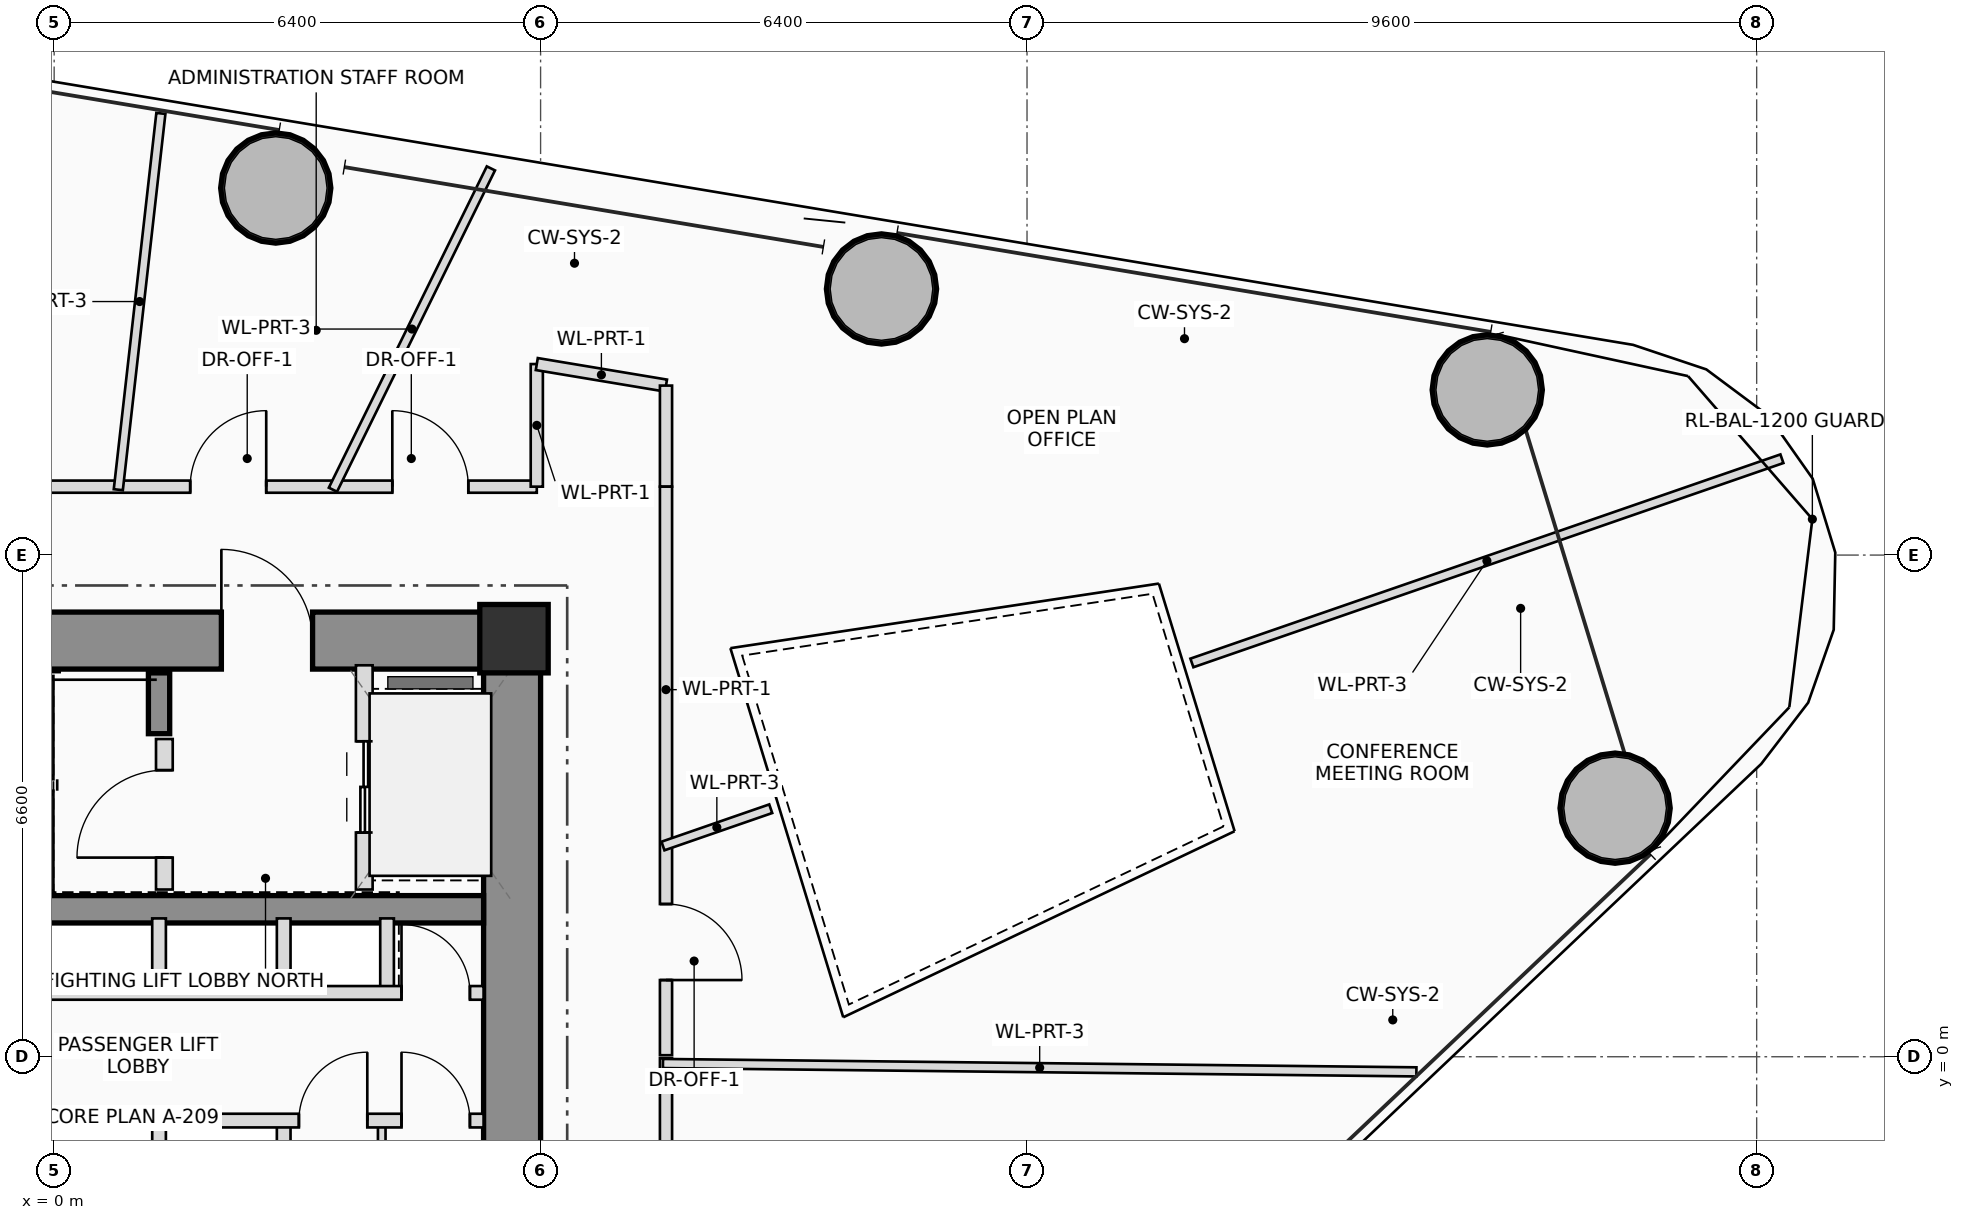
"""IFC4 building model, lengths in metres.
Left out: names, types, materials, properties, quantities, classifications, styles, units other than length and angle.
Written with IfcOpenShell. Run it as: python <this file> out.ifc"""

import sys

from ifc_helpers import new_model, si_unit, direction, frame, frame_2d, origin, origin_2d, place, context, subcontext, project, spatial, rectangle, hollow_circle, extrude, source, transform, mapped, element, fill, save


model = new_model("IFC4")
c1 = context("Model", 3, precision=1e-05, world=origin(), true_north=direction((0.0, 1.0)))
c2 = subcontext(c1, "Body", "Model", "MODEL_VIEW")
j1 = project(units=[si_unit("LENGTHUNIT", "METRE"), si_unit("PLANEANGLEUNIT", "RADIAN")], contexts=[c1])
p1 = place(None, origin())
s1 = spatial("IfcSite", under=j1, at=p1, CompositionType="ELEMENT")
p2 = place(p1, origin())
s2 = spatial("IfcBuilding", under=s1, at=p2, CompositionType="ELEMENT")
p3 = place(p2, frame((0.0, 0.0, 93.65)))
s3 = spatial("IfcBuildingStorey", under=s2, at=p3, CompositionType="ELEMENT", Elevation=93.65)
m1 = source(origin(), c2, "Body", "SweptSolid", [
    extrude(rectangle(XDim=0.9, YDim=0.9, at=origin_2d()), origin(), (0.0, 0.0, 1.0), 3.75),
])
p4 = place(p3, frame((6.05, 5.5, 0.0), z_axis=(0.0, 0.0, 1.0), x_axis=(1.0, 0.0, 0.0)))
e1 = element("IfcColumn", 1, at=p4, inside=s3, PredefinedType="COLUMN", context=c2, shape_type="MappedRepresentation", body=[
    mapped(m1, transform((0.0, 0.0, 0.0), scale=1.0)),
])
p5 = place(p3, frame((-6.4, 5.475, 0.0), z_axis=(0.0, 0.0, 1.0), x_axis=(1.0, 0.0, 0.0)))
e2 = element("IfcWall", 2, at=p5, inside=s3, PredefinedType="SHEAR", context=c2, shape_type="SweptSolid", body=[
    extrude(rectangle(XDim=12.8, YDim=0.75, at=frame_2d((6.4, 0.0))), origin(), (0.0, 0.0, 1.0), 3.75),
])
p6 = place(p5, frame((8.6, 0.0, 0.0)))
e3 = element("IfcOpeningElement", 3, at=p6, cuts=e2, PredefinedType="OPENING", context=c2, shape_type="SweptSolid", body=[
    extrude(rectangle(XDim=1.2, YDim=2.2, at=frame_2d((0.6, 1.1))), frame((0.0, 0.385, 0.0), z_axis=(0.0, -1.0, 0.0), x_axis=(1.0, 0.0, 0.0)), (0.0, 0.0, 1.0), 0.77),
])
p7 = place(p3, frame((6.025, -5.1, 0.0), z_axis=(0.0, 0.0, 1.0), x_axis=(0.0, 1.0, 0.0)))
e4 = element("IfcWall", 4, at=p7, inside=s3, PredefinedType="SHEAR", context=c2, shape_type="SweptSolid", body=[
    extrude(rectangle(XDim=10.2, YDim=0.75, at=frame_2d((5.1, 0.0))), origin(), (0.0, 0.0, 1.0), 3.75),
])
p8 = place(p3, frame((-5.65, 1.94, 0.0), z_axis=(0.0, 0.0, 1.0), x_axis=(1.0, 0.0, 0.0)))
e5 = element("IfcWall", 5, at=p8, inside=s3, PredefinedType="SHEAR", context=c2, shape_type="SweptSolid", body=[
    extrude(rectangle(XDim=11.3, YDim=0.36, at=frame_2d((5.65, 0.0))), origin(), (0.0, 0.0, 1.0), 3.75),
])
p9 = place(p3, frame((1.38, 4.25, 0.0), z_axis=(0.0, 0.0, 1.0), x_axis=(0.0, 1.0, 0.0)))
e6 = element("IfcWall", 6, at=p9, inside=s3, PredefinedType="SHEAR", context=c2, shape_type="SweptSolid", body=[
    extrude(rectangle(XDim=0.8, YDim=0.28, at=frame_2d((0.4, 0.0))), origin(), (0.0, 0.0, 1.0), 3.75),
])
m2 = source(origin(), c2, "Body", "SweptSolid", [
    extrude(hollow_circle(Radius=0.725, WallThickness=0.05, at=origin_2d()), origin(), (0.0, 0.0, 1.0), 3.75),
])
for number, where, z_axis, x_axis in (
    (7, (20.538, 3.271, 0.0), (0.0, 0.0, 1.0), (1.0, 0.0, 0.0)),
    (8, (18.855, 8.773, 0.0), (0.0, 0.0, 1.0), (1.0, 0.0, 0.0)),
    (9, (10.885, 10.101, 0.0), (0.0, 0.0, 1.0), (1.0, 0.0, 0.0)),
    (10, (2.915, 11.429, 0.0), (0.0, 0.0, 1.0), (1.0, 0.0, 0.0)),
):
    element("IfcColumn", number, at=place(p3, frame(where, z_axis=z_axis, x_axis=x_axis)), inside=s3, PredefinedType="COLUMN", context=c2, shape_type="MappedRepresentation", body=[
        mapped(m2, transform((0.0, 0.0, 0.0), scale=1.0)),
    ])
p10 = place(p3, frame((1.45, 2.2, 0.0), z_axis=(0.0, 0.0, 1.0), x_axis=(0.0, 1.0, 0.0)))
e11 = element("IfcWall", 11, at=p10, inside=s3, PredefinedType="PLUMBINGWALL", context=c2, shape_type="SweptSolid", body=[
    extrude(rectangle(XDim=1.98, YDim=0.22, at=frame_2d((0.99, 0.0))), origin(), (0.0, 0.0, 1.0), 3.545),
])
p11 = place(p10, frame((0.42, 0.0, 0.0)))
e12 = element("IfcOpeningElement", 12, at=p11, cuts=e11, PredefinedType="OPENING", context=c2, shape_type="SweptSolid", body=[
    extrude(rectangle(XDim=1.15, YDim=2.15, at=frame_2d((0.575, 1.075))), frame((0.0, 0.12, 0.0), z_axis=(0.0, -1.0, 0.0), x_axis=(1.0, 0.0, 0.0)), (0.0, 0.0, 1.0), 0.24),
])
p12 = place(p3, frame((4.08, 2.2, 0.0), z_axis=(0.0, 0.0, 1.0), x_axis=(0.0, 1.0, 0.0)))
e13 = element("IfcWall", 13, at=p12, inside=s3, PredefinedType="PLUMBINGWALL", context=c2, shape_type="SweptSolid", body=[
    extrude(rectangle(XDim=2.95, YDim=0.22, at=frame_2d((1.475, 0.0))), origin(), (0.0, 0.0, 1.0), 3.545),
])
p13 = place(p12, frame((0.75, 0.0, 0.0)))
e14 = element("IfcOpeningElement", 14, at=p13, cuts=e13, PredefinedType="OPENING", context=c2, shape_type="SweptSolid", body=[
    extrude(rectangle(XDim=1.2, YDim=2.25, at=frame_2d((0.6, 1.125))), frame((0.0, 0.12, 0.0), z_axis=(0.0, -1.0, 0.0), x_axis=(1.0, 0.0, 0.0)), (0.0, 0.0, 1.0), 0.24),
])
for number, where, z_axis, x_axis in (
    (15, (1.38, 0.84, 0.0), (0.0, 0.0, 1.0), (0.0, 1.0, 0.0)),
    (16, (1.38, -1.82, 0.0), (0.0, 0.0, 1.0), (0.0, 1.0, 0.0)),
    (17, (3.02, 0.84, 0.0), (0.0, 0.0, 1.0), (0.0, 1.0, 0.0)),
    (18, (4.38, 0.84, 0.0), (0.0, 0.0, 1.0), (0.0, 1.0, 0.0)),
    (19, (3.02, -1.82, 0.0), (0.0, 0.0, 1.0), (0.0, 1.0, 0.0)),
):
    element("IfcWall", number, at=place(p3, frame(where, z_axis=z_axis, x_axis=x_axis)), inside=s3, PredefinedType="PLUMBINGWALL", context=c2, shape_type="SweptSolid", body=[
        extrude(rectangle(XDim=0.98, YDim=0.18, at=frame_2d((0.49, 0.0))), origin(), (0.0, 0.0, 1.0), 3.545),
    ])
p14 = place(p3, frame((4.31, -1.82, 0.0), z_axis=(0.0, 0.0, 1.0), x_axis=(0.0, 1.0, 0.0)))
e20 = element("IfcWall", 20, at=p14, inside=s3, PredefinedType="PARTITIONING", context=c2, shape_type="SweptSolid", body=[
    extrude(rectangle(XDim=0.98, YDim=0.1, at=frame_2d((0.49, 0.0))), origin(), (0.0, 0.0, 1.0), 3.545),
])
p15 = place(p3, frame((-5.68, 0.84, 0.0), z_axis=(0.0, 0.0, 1.0), x_axis=(1.0, 0.0, 0.0)))
e21 = element("IfcWall", 21, at=p15, inside=s3, PredefinedType="PLUMBINGWALL", context=c2, shape_type="SweptSolid", body=[
    extrude(rectangle(XDim=11.33, YDim=0.18, at=frame_2d((5.665, 0.0))), origin(), (0.0, 0.0, 1.0), 3.545),
])
p16 = place(p15, frame((0.43, 0.0, 0.0)))
e22 = element("IfcOpeningElement", 22, at=p16, cuts=e21, PredefinedType="OPENING", context=c2, shape_type="SweptSolid", body=[
    extrude(rectangle(XDim=1.1, YDim=2.2, at=frame_2d((0.55, 1.1))), frame((0.0, 0.1, 0.0), z_axis=(0.0, -1.0, 0.0), x_axis=(1.0, 0.0, 0.0)), (0.0, 0.0, 1.0), 0.2),
])
p17 = place(p15, frame((2.13, 0.0, 0.0)))
e23 = element("IfcOpeningElement", 23, at=p17, cuts=e21, PredefinedType="OPENING", context=c2, shape_type="SweptSolid", body=[
    extrude(rectangle(XDim=1.1, YDim=2.2, at=frame_2d((0.55, 1.1))), frame((0.0, 0.1, 0.0), z_axis=(0.0, -1.0, 0.0), x_axis=(1.0, 0.0, 0.0)), (0.0, 0.0, 1.0), 0.2),
])
p18 = place(p15, frame((10.25, 0.0, 0.0)))
e24 = element("IfcOpeningElement", 24, at=p18, cuts=e21, PredefinedType="OPENING", context=c2, shape_type="SweptSolid", body=[
    extrude(rectangle(XDim=0.9, YDim=2.05, at=frame_2d((0.45, 1.025))), frame((0.0, 0.1, 0.0), z_axis=(0.0, -1.0, 0.0), x_axis=(1.0, 0.0, 0.0)), (0.0, 0.0, 1.0), 0.2),
])
p19 = place(p3, frame((-5.68, -0.84, 0.0), z_axis=(0.0, 0.0, 1.0), x_axis=(1.0, 0.0, 0.0)))
e25 = element("IfcWall", 25, at=p19, inside=s3, PredefinedType="PLUMBINGWALL", context=c2, shape_type="SweptSolid", body=[
    extrude(rectangle(XDim=11.33, YDim=0.18, at=frame_2d((5.665, 0.0))), origin(), (0.0, 0.0, 1.0), 3.545),
])
p20 = place(p19, frame((0.43, 0.0, 0.0)))
e26 = element("IfcOpeningElement", 26, at=p20, cuts=e25, PredefinedType="OPENING", context=c2, shape_type="SweptSolid", body=[
    extrude(rectangle(XDim=1.1, YDim=2.2, at=frame_2d((0.55, 1.1))), frame((0.0, 0.1, 0.0), z_axis=(0.0, -1.0, 0.0), x_axis=(1.0, 0.0, 0.0)), (0.0, 0.0, 1.0), 0.2),
])
p21 = place(p19, frame((2.13, 0.0, 0.0)))
e27 = element("IfcOpeningElement", 27, at=p21, cuts=e25, PredefinedType="OPENING", context=c2, shape_type="SweptSolid", body=[
    extrude(rectangle(XDim=1.1, YDim=2.2, at=frame_2d((0.55, 1.1))), frame((0.0, 0.1, 0.0), z_axis=(0.0, -1.0, 0.0), x_axis=(1.0, 0.0, 0.0)), (0.0, 0.0, 1.0), 0.2),
])
p22 = place(p19, frame((8.9, 0.0, 0.0)))
e28 = element("IfcOpeningElement", 28, at=p22, cuts=e25, PredefinedType="OPENING", context=c2, shape_type="SweptSolid", body=[
    extrude(rectangle(XDim=0.9, YDim=2.05, at=frame_2d((0.45, 1.025))), frame((0.0, 0.1, 0.0), z_axis=(0.0, -1.0, 0.0), x_axis=(1.0, 0.0, 0.0)), (0.0, 0.0, 1.0), 0.2),
])
p23 = place(p19, frame((10.25, 0.0, 0.0)))
e29 = element("IfcOpeningElement", 29, at=p23, cuts=e25, PredefinedType="OPENING", context=c2, shape_type="SweptSolid", body=[
    extrude(rectangle(XDim=0.9, YDim=2.05, at=frame_2d((0.45, 1.025))), frame((0.0, 0.1, 0.0), z_axis=(0.0, -1.0, 0.0), x_axis=(1.0, 0.0, 0.0)), (0.0, 0.0, 1.0), 0.2),
])
p24 = place(p3, frame((-6.35, 7.5, 0.0), z_axis=(0.0, 0.0, 1.0), x_axis=(1.0, 0.0, 0.0)))
e30 = element("IfcWall", 30, at=p24, inside=s3, PredefinedType="PARTITIONING", context=c2, shape_type="SweptSolid", body=[
    extrude(rectangle(XDim=12.7, YDim=0.16, at=frame_2d((6.35, 0.0))), origin(), (0.0, 0.0, 1.0), 2.85),
])
p25 = place(p24, frame((8.14, 0.0, 0.0)))
e31 = element("IfcOpeningElement", 31, at=p25, cuts=e30, PredefinedType="OPENING", context=c2, shape_type="SweptSolid", body=[
    extrude(rectangle(XDim=1.0, YDim=2.25, at=frame_2d((0.5, 1.125))), frame((0.0, 0.09, 0.0), z_axis=(0.0, -1.0, 0.0), x_axis=(1.0, 0.0, 0.0)), (0.0, 0.0, 1.0), 0.18),
])
p26 = place(p24, frame((10.799, 0.0, 0.0)))
e32 = element("IfcOpeningElement", 32, at=p26, cuts=e30, PredefinedType="OPENING", context=c2, shape_type="SweptSolid", body=[
    extrude(rectangle(XDim=1.0, YDim=2.25, at=frame_2d((0.5, 1.125))), frame((0.0, 0.09, 0.0), z_axis=(0.0, -1.0, 0.0), x_axis=(1.0, 0.0, 0.0)), (0.0, 0.0, 1.0), 0.18),
])
p27 = place(p3, frame((6.35, 7.5, 0.0), z_axis=(0.0, 0.0, 1.0), x_axis=(0.0, 1.0, 0.0)))
e33 = element("IfcWall", 33, at=p27, inside=s3, PredefinedType="PARTITIONING", context=c2, shape_type="SweptSolid", body=[
    extrude(rectangle(XDim=1.613, YDim=0.16, at=frame_2d((0.807, 0.0))), origin(), (0.0, 0.0, 1.0), 3.05),
])
p28 = place(p3, frame((6.35, 9.113, 0.0), z_axis=(0.0, 0.0, 1.0), x_axis=(0.986405407683, -0.164330069354, 0.0)))
e34 = element("IfcWall", 34, at=p28, inside=s3, PredefinedType="PARTITIONING", context=c2, shape_type="SweptSolid", body=[
    extrude(rectangle(XDim=1.723, YDim=0.16, at=frame_2d((0.862, 0.0))), origin(), (0.0, 0.0, 1.0), 3.2),
])
p29 = place(p3, frame((8.05, 8.83, 0.0), z_axis=(0.0, 0.0, 1.0), x_axis=(0.0, -1.0, 0.0)))
e35 = element("IfcWall", 35, at=p29, inside=s3, PredefinedType="PARTITIONING", context=c2, shape_type="SweptSolid", body=[
    extrude(rectangle(XDim=1.33, YDim=0.16, at=frame_2d((0.665, 0.0))), origin(), (0.0, 0.0, 1.0), 2.85),
])
p30 = place(p3, frame((8.05, 7.5, 0.0), z_axis=(0.0, 0.0, 1.0), x_axis=(0.0, -1.0, 0.0)))
e36 = element("IfcWall", 36, at=p30, inside=s3, PredefinedType="PARTITIONING", context=c2, shape_type="SweptSolid", body=[
    extrude(rectangle(XDim=7.48, YDim=0.16, at=frame_2d((3.74, 0.0))), origin(), (0.0, 0.0, 1.0), 2.85),
])
p31 = place(p30, frame((5.491, 0.0, 0.0)))
e37 = element("IfcOpeningElement", 37, at=p31, cuts=e36, PredefinedType="OPENING", context=c2, shape_type="SweptSolid", body=[
    extrude(rectangle(XDim=1.0, YDim=2.25, at=frame_2d((0.5, 1.125))), frame((0.0, 0.09, 0.0), z_axis=(0.0, -1.0, 0.0), x_axis=(1.0, 0.0, 0.0)), (0.0, 0.0, 1.0), 0.18),
])
p32 = place(p3, frame((8.05, -0.02, 0.0), z_axis=(0.0, 0.0, 1.0), x_axis=(0.0, -1.0, 0.0)))
e38 = element("IfcWall", 38, at=p32, inside=s3, PredefinedType="PARTITIONING", context=c2, shape_type="SweptSolid", body=[
    extrude(rectangle(XDim=6.174, YDim=0.16, at=frame_2d((3.087, 0.0))), origin(), (0.0, 0.0, 1.0), 2.85),
])
p33 = place(p32, frame((2.587, 0.0, 0.0)))
e39 = element("IfcOpeningElement", 39, at=p33, cuts=e38, PredefinedType="OPENING", context=c2, shape_type="SweptSolid", body=[
    extrude(rectangle(XDim=1.0, YDim=2.25, at=frame_2d((0.5, 1.125))), frame((0.0, 0.09, 0.0), z_axis=(0.0, -1.0, 0.0), x_axis=(1.0, 0.0, 0.0)), (0.0, 0.0, 1.0), 0.18),
])
p34 = place(p3, frame((8.01, -0.089, 0.0), z_axis=(0.0, 0.0, 1.0), x_axis=(0.999938319872, -0.011106594972, 0.0)))
e40 = element("IfcWall", 40, at=p34, inside=s3, PredefinedType="PARTITIONING", context=c2, shape_type="SweptSolid", body=[
    extrude(rectangle(XDim=9.914, YDim=0.12, at=frame_2d((4.957, 0.0))), origin(), (0.0, 0.0, 1.0), 2.85),
])
p35 = place(p3, frame((8.01, 2.772, 0.0), z_axis=(0.0, 0.0, 1.0), x_axis=(0.945009284385, 0.327043502344, 0.0)))
e41 = element("IfcWall", 41, at=p35, inside=s3, PredefinedType="PARTITIONING", context=c2, shape_type="SweptSolid", body=[
    extrude(rectangle(XDim=1.5, YDim=0.12, at=frame_2d((0.75, 0.0))), origin(), (0.0, 0.0, 1.0), 3.21),
])
p36 = place(p3, frame((14.969, 5.181, 0.0), z_axis=(0.0, 0.0, 1.0), x_axis=(0.945001266043, 0.327066670843, 0.0)))
e42 = element("IfcWall", 42, at=p36, inside=s3, PredefinedType="PARTITIONING", context=c2, shape_type="SweptSolid", body=[
    extrude(rectangle(XDim=8.215, YDim=0.12, at=frame_2d((4.107, 0.0))), origin(), (0.0, 0.0, 1.0), 3.01),
])
p37 = place(p3, frame((3.668, 7.46, 0.0), z_axis=(0.0, 0.0, 1.0), x_axis=(0.441212238914, 0.897402785951, 0.0)))
e43 = element("IfcWall", 43, at=p37, inside=s3, PredefinedType="PARTITIONING", context=c2, shape_type="SweptSolid", body=[
    extrude(rectangle(XDim=4.711, YDim=0.12, at=frame_2d((2.355, 0.0))), origin(), (0.0, 0.0, 1.0), 2.85),
])
p38 = place(p3, frame((0.844, 7.46, 0.0), z_axis=(0.0, 0.0, 1.0), x_axis=(0.112405035284, 0.99366247189, 0.0)))
e44 = element("IfcWall", 44, at=p38, inside=s3, PredefinedType="PARTITIONING", context=c2, shape_type="SweptSolid", body=[
    extrude(rectangle(XDim=4.982, YDim=0.12, at=frame_2d((2.491, 0.0))), origin(), (0.0, 0.0, 1.0), 3.01),
])
p39 = place(p6, origin())
e45 = element("IfcDoor", 45, at=p39, inside=s3, OperationType="SINGLE_SWING_LEFT", PredefinedType="DOOR", context=c2, shape_type="SweptSolid", body=[
    extrude(rectangle(XDim=1.2, YDim=2.2, at=frame_2d((0.6, 1.1))), frame((0.0, 0.025, 0.0), z_axis=(0.0, -1.0, 0.0), x_axis=(1.0, 0.0, 0.0)), (0.0, 0.0, 1.0), 0.05),
])
fill(e3, e45)
p40 = place(p11, origin())
e46 = element("IfcDoor", 46, at=p40, inside=s3, OperationType="SINGLE_SWING_LEFT", PredefinedType="DOOR", context=c2, shape_type="SweptSolid", body=[
    extrude(rectangle(XDim=1.15, YDim=2.15, at=frame_2d((0.575, 1.075))), frame((0.0, 0.025, 0.0), z_axis=(0.0, -1.0, 0.0), x_axis=(1.0, 0.0, 0.0)), (0.0, 0.0, 1.0), 0.05),
])
fill(e12, e46)
p41 = place(p13, origin())
e47 = element("IfcDoor", 47, at=p41, inside=s3, OperationType="DOUBLE_DOOR_SLIDING", PredefinedType="DOOR", context=c2, shape_type="SweptSolid", body=[
    extrude(rectangle(XDim=1.2, YDim=2.25, at=frame_2d((0.6, 1.125))), frame((0.0, 0.025, 0.0), z_axis=(0.0, -1.0, 0.0), x_axis=(1.0, 0.0, 0.0)), (0.0, 0.0, 1.0), 0.05),
])
fill(e14, e47)
p42 = place(p18, origin())
e48 = element("IfcDoor", 48, at=p42, inside=s3, OperationType="SINGLE_SWING_LEFT", PredefinedType="DOOR", context=c2, shape_type="SweptSolid", body=[
    extrude(rectangle(XDim=0.9, YDim=2.05, at=frame_2d((0.45, 1.025))), frame((0.0, 0.025, 0.0), z_axis=(0.0, -1.0, 0.0), x_axis=(1.0, 0.0, 0.0)), (0.0, 0.0, 1.0), 0.05),
])
fill(e24, e48)
p43 = place(p22, origin())
e49 = element("IfcDoor", 49, at=p43, inside=s3, OperationType="SINGLE_SWING_RIGHT", PredefinedType="DOOR", context=c2, shape_type="SweptSolid", body=[
    extrude(rectangle(XDim=0.9, YDim=2.05, at=frame_2d((0.45, 1.025))), frame((0.0, 0.025, 0.0), z_axis=(0.0, -1.0, 0.0), x_axis=(1.0, 0.0, 0.0)), (0.0, 0.0, 1.0), 0.05),
])
fill(e28, e49)
p44 = place(p23, origin())
e50 = element("IfcDoor", 50, at=p44, inside=s3, OperationType="SINGLE_SWING_LEFT", PredefinedType="DOOR", context=c2, shape_type="SweptSolid", body=[
    extrude(rectangle(XDim=0.9, YDim=2.05, at=frame_2d((0.45, 1.025))), frame((0.0, 0.025, 0.0), z_axis=(0.0, -1.0, 0.0), x_axis=(1.0, 0.0, 0.0)), (0.0, 0.0, 1.0), 0.05),
])
fill(e29, e50)
p45 = place(p25, origin())
e51 = element("IfcDoor", 51, at=p45, inside=s3, OperationType="SINGLE_SWING_RIGHT", PredefinedType="DOOR", context=c2, shape_type="SweptSolid", body=[
    extrude(rectangle(XDim=1.0, YDim=2.25, at=frame_2d((0.5, 1.125))), frame((0.0, 0.025, 0.0), z_axis=(0.0, -1.0, 0.0), x_axis=(1.0, 0.0, 0.0)), (0.0, 0.0, 1.0), 0.05),
])
fill(e31, e51)
p46 = place(p26, origin())
e52 = element("IfcDoor", 52, at=p46, inside=s3, OperationType="SINGLE_SWING_LEFT", PredefinedType="DOOR", context=c2, shape_type="SweptSolid", body=[
    extrude(rectangle(XDim=1.0, YDim=2.25, at=frame_2d((0.5, 1.125))), frame((0.0, 0.025, 0.0), z_axis=(0.0, -1.0, 0.0), x_axis=(1.0, 0.0, 0.0)), (0.0, 0.0, 1.0), 0.05),
])
fill(e32, e52)
p47 = place(p31, origin())
e53 = element("IfcDoor", 53, at=p47, inside=s3, OperationType="SINGLE_SWING_RIGHT", PredefinedType="DOOR", context=c2, shape_type="SweptSolid", body=[
    extrude(rectangle(XDim=1.0, YDim=2.25, at=frame_2d((0.5, 1.125))), frame((0.0, 0.025, 0.0), z_axis=(0.0, -1.0, 0.0), x_axis=(1.0, 0.0, 0.0)), (0.0, 0.0, 1.0), 0.05),
])
fill(e37, e53)
save(model, sys.argv[1])
